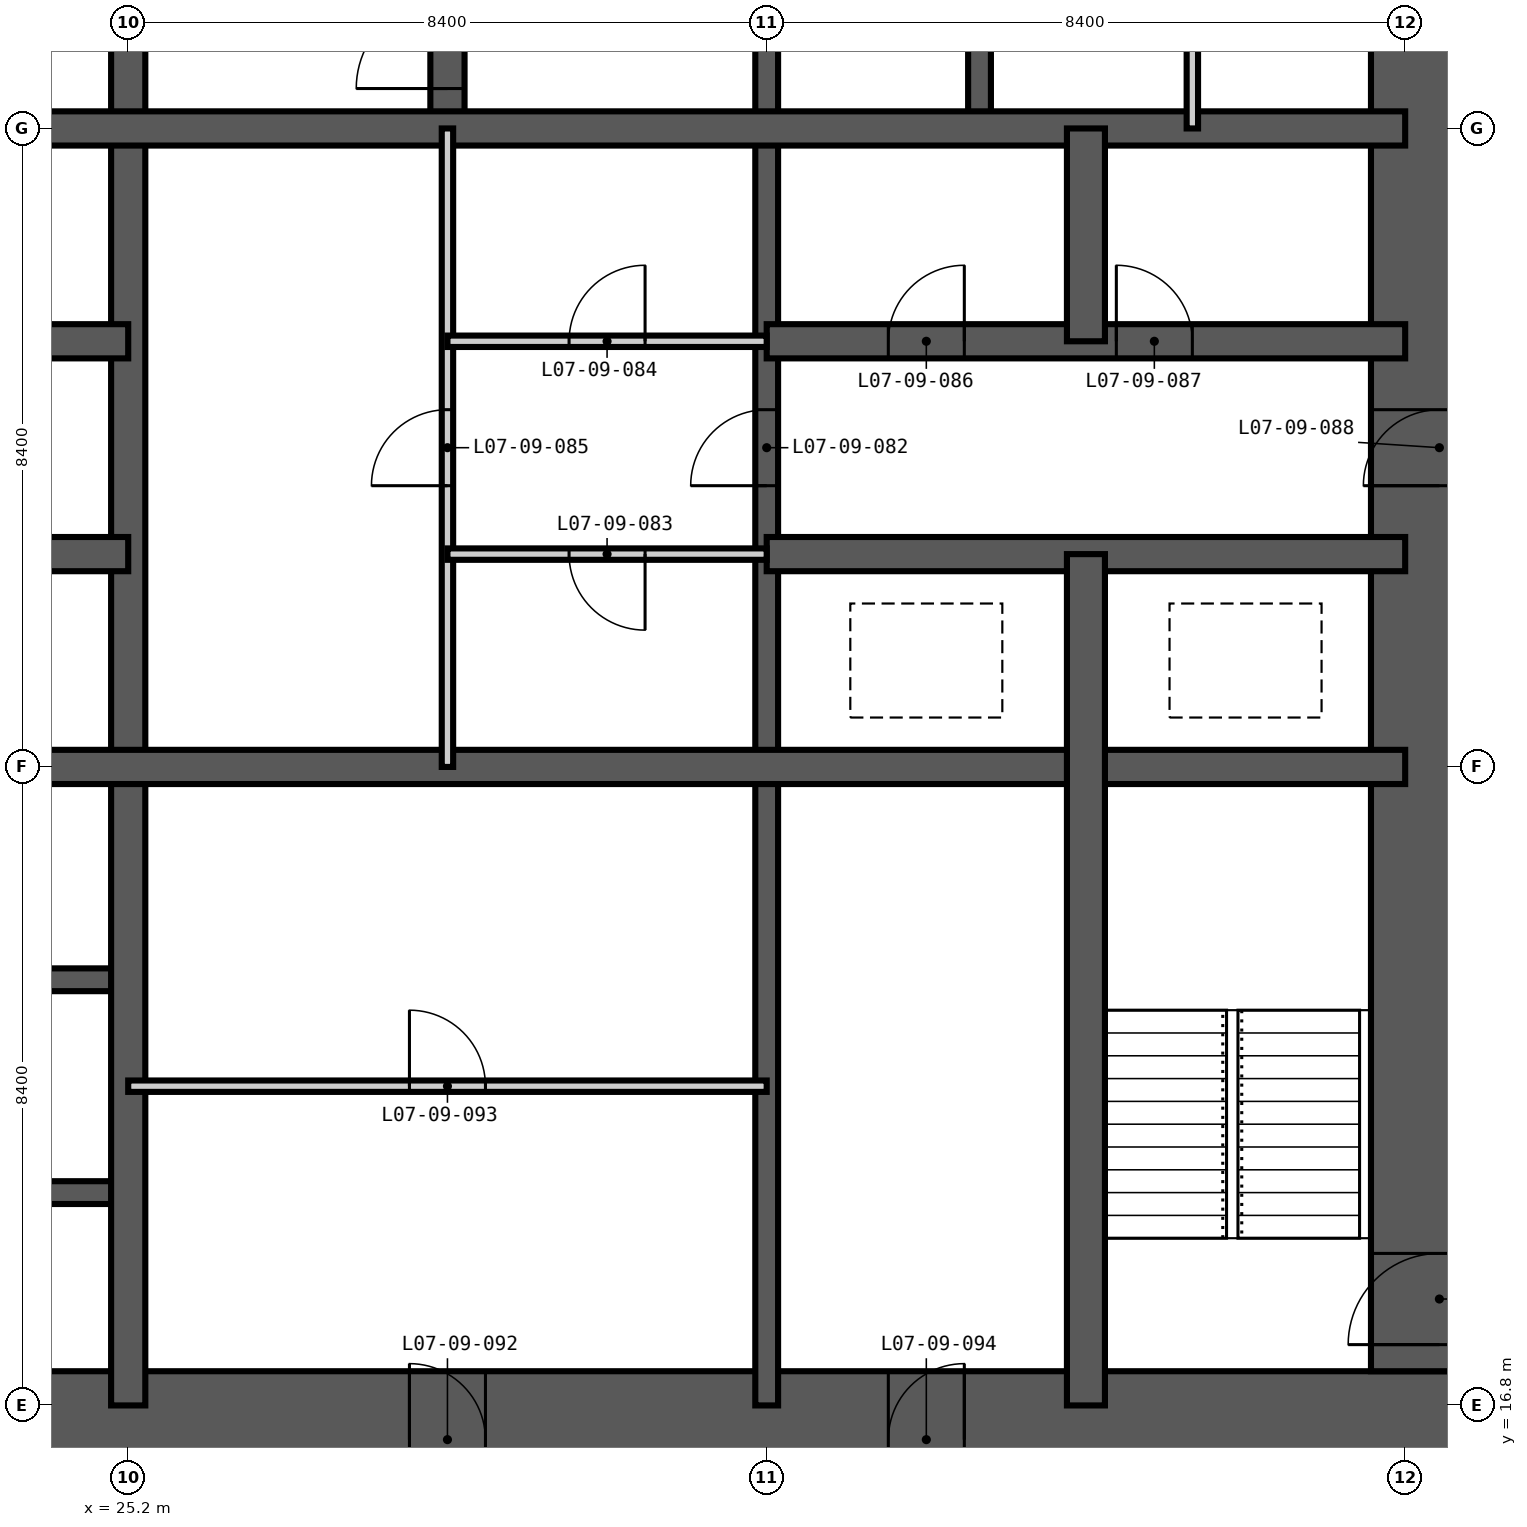
"""IFC4 building model, lengths in metres.
Left out: names, types, materials, properties, quantities, classifications, styles, units other than length and angle.
Written with IfcOpenShell. Run it as: python <this file> out.ifc"""

import sys

from ifc_helpers import new_model, si_unit, direction, frame, frame_2d, origin, place, context, subcontext, project, spatial, rectangle, extrude, element, fill, save


model = new_model("IFC4")
c1 = context("Model", 3, precision=1e-05, world=origin(), true_north=direction((0.0, 1.0)))
c2 = subcontext(c1, "Body", "Model", "MODEL_VIEW")
j1 = project(units=[si_unit("LENGTHUNIT", "METRE"), si_unit("PLANEANGLEUNIT", "RADIAN")], contexts=[c1])
p1 = place(None, origin())
s1 = spatial("IfcSite", under=j1, at=p1, CompositionType="ELEMENT")
p2 = place(p1, origin())
s2 = spatial("IfcBuilding", under=s1, at=p2, CompositionType="ELEMENT")
p3 = place(p2, frame((0.0, 0.0, 34.2)))
s3 = spatial("IfcBuildingStorey", under=s2, at=p3, CompositionType="ELEMENT", Elevation=34.2)
p4 = place(p3, frame((15.45, 16.35, -0.35), z_axis=(0.0, 0.0, 1.0), x_axis=(1.0, 0.0, 0.0)))
e1 = element("IfcWall", 1, at=p4, inside=s3, PredefinedType="SHEAR", context=c2, shape_type="SweptSolid", body=[
    extrude(rectangle(XDim=27.9, YDim=1.8, at=frame_2d((13.95, 0.0))), origin(), (0.0, 0.0, 1.0), 3.6),
])
p5 = place(p4, frame((13.45, 0.0, 0.35)))
e2 = element("IfcOpeningElement", 2, at=p5, cuts=e1, PredefinedType="OPENING", context=c2, shape_type="SweptSolid", body=[
    extrude(rectangle(XDim=1.0, YDim=2.1, at=frame_2d((0.5, 1.05))), frame((0.0, 0.91, 0.0), z_axis=(0.0, -1.0, 0.0), x_axis=(1.0, 0.0, 0.0)), (0.0, 0.0, 1.0), 1.82),
])
p6 = place(p4, frame((19.75, 0.0, 0.35)))
e3 = element("IfcOpeningElement", 3, at=p6, cuts=e1, PredefinedType="OPENING", context=c2, shape_type="SweptSolid", body=[
    extrude(rectangle(XDim=1.0, YDim=2.1, at=frame_2d((0.5, 1.05))), frame((0.0, 0.91, 0.0), z_axis=(0.0, -1.0, 0.0), x_axis=(1.0, 0.0, 0.0)), (0.0, 0.0, 1.0), 1.82),
])
p7 = place(p3, frame((42.45, 17.25, -0.35), z_axis=(0.0, 0.0, 1.0), x_axis=(0.0, 1.0, 0.0)))
e4 = element("IfcWall", 4, at=p7, inside=s3, PredefinedType="SHEAR", context=c2, shape_type="SweptSolid", body=[
    extrude(rectangle(XDim=24.3, YDim=1.8, at=frame_2d((12.15, 0.0))), origin(), (0.0, 0.0, 1.0), 3.6),
])
p8 = place(p7, frame((0.35, 0.0, 0.35)))
e5 = element("IfcOpeningElement", 5, at=p8, cuts=e4, PredefinedType="OPENING", context=c2, shape_type="SweptSolid", body=[
    extrude(rectangle(XDim=1.2, YDim=2.2, at=frame_2d((0.6, 1.1))), frame((0.0, 0.91, 0.0), z_axis=(0.0, -1.0, 0.0), x_axis=(1.0, 0.0, 0.0)), (0.0, 0.0, 1.0), 1.82),
])
p9 = place(p7, frame((11.65, 0.0, 0.35)))
e6 = element("IfcOpeningElement", 6, at=p9, cuts=e4, PredefinedType="OPENING", context=c2, shape_type="SweptSolid", body=[
    extrude(rectangle(XDim=1.0, YDim=2.1, at=frame_2d((0.5, 1.05))), frame((0.0, 0.91, 0.0), z_axis=(0.0, -1.0, 0.0), x_axis=(1.0, 0.0, 0.0)), (0.0, 0.0, 1.0), 1.82),
])
p10 = place(p7, frame((20.05, 0.0, 0.35)))
e7 = element("IfcOpeningElement", 7, at=p10, cuts=e4, PredefinedType="OPENING", context=c2, shape_type="SweptSolid", body=[
    extrude(rectangle(XDim=1.0, YDim=2.1, at=frame_2d((0.5, 1.05))), frame((0.0, 0.91, 0.0), z_axis=(0.0, -1.0, 0.0), x_axis=(1.0, 0.0, 0.0)), (0.0, 0.0, 1.0), 1.82),
])
p11 = place(p3, frame((33.6, 16.8, -0.35), z_axis=(0.0, 0.0, 1.0), x_axis=(0.0, 1.0, 0.0)))
e8 = element("IfcWall", 8, at=p11, inside=s3, PredefinedType="SHEAR", context=c2, shape_type="SweptSolid", body=[
    extrude(rectangle(XDim=25.2, YDim=0.3, at=frame_2d((12.6, 0.0))), origin(), (0.0, 0.0, 1.0), 3.6),
])
p12 = place(p11, frame((22.5, 0.0, 0.35)))
e9 = element("IfcOpeningElement", 9, at=p12, cuts=e8, PredefinedType="OPENING", context=c2, shape_type="SweptSolid", body=[
    extrude(rectangle(XDim=1.2, YDim=2.2, at=frame_2d((0.6, 1.1))), frame((0.0, 0.16, 0.0), z_axis=(0.0, -1.0, 0.0), x_axis=(1.0, 0.0, 0.0)), (0.0, 0.0, 1.0), 0.32),
])
p13 = place(p11, frame((18.3, 0.0, 0.35)))
e10 = element("IfcOpeningElement", 10, at=p13, cuts=e8, PredefinedType="OPENING", context=c2, shape_type="SweptSolid", body=[
    extrude(rectangle(XDim=1.2, YDim=2.2, at=frame_2d((0.6, 1.1))), frame((0.0, 0.16, 0.0), z_axis=(0.0, -1.0, 0.0), x_axis=(1.0, 0.0, 0.0)), (0.0, 0.0, 1.0), 0.32),
])
p14 = place(p11, frame((12.1, 0.0, 0.35)))
e11 = element("IfcOpeningElement", 11, at=p14, cuts=e8, PredefinedType="OPENING", context=c2, shape_type="SweptSolid", body=[
    extrude(rectangle(XDim=1.0, YDim=2.1, at=frame_2d((0.5, 1.05))), frame((0.0, 0.16, 0.0), z_axis=(0.0, -1.0, 0.0), x_axis=(1.0, 0.0, 0.0)), (0.0, 0.0, 1.0), 0.32),
])
for number, where, z_axis, x_axis in (
    (12, (36.4, 33.6, -0.35), (0.0, 0.0, 1.0), (0.0, 1.0, 0.0)),
    (13, (16.8, 19.6, -0.35), (0.0, 0.0, 1.0), (1.0, 0.0, 0.0)),
    (14, (16.8, 22.4, -0.35), (0.0, 0.0, 1.0), (1.0, 0.0, 0.0)),
):
    element("IfcWall", number, at=place(p3, frame(where, z_axis=z_axis, x_axis=x_axis)), inside=s3, PredefinedType="SHEAR", context=c2, shape_type="SweptSolid", body=[
        extrude(rectangle(XDim=8.4, YDim=0.3, at=frame_2d((4.2, 0.0))), origin(), (0.0, 0.0, 1.0), 3.6),
    ])
p15 = place(p3, frame((25.2, 16.8, -0.35), z_axis=(0.0, 0.0, 1.0), x_axis=(0.0, 1.0, 0.0)))
e15 = element("IfcWall", 15, at=p15, inside=s3, PredefinedType="SHEAR", context=c2, shape_type="SweptSolid", body=[
    extrude(rectangle(XDim=25.2, YDim=0.45, at=frame_2d((12.6, 0.0))), origin(), (0.0, 0.0, 1.0), 3.6),
])
p16 = place(p3, frame((29.4, 33.6, -0.35), z_axis=(0.0, 0.0, 1.0), x_axis=(0.0, 1.0, 0.0)))
e16 = element("IfcWall", 16, at=p16, inside=s3, PredefinedType="SHEAR", context=c2, shape_type="SweptSolid", body=[
    extrude(rectangle(XDim=8.4, YDim=0.45, at=frame_2d((4.2, 0.0))), origin(), (0.0, 0.0, 1.0), 3.6),
])
p17 = place(p16, frame((0.525, 0.0, 0.35)))
e17 = element("IfcOpeningElement", 17, at=p17, cuts=e16, PredefinedType="OPENING", context=c2, shape_type="SweptSolid", body=[
    extrude(rectangle(XDim=1.2, YDim=2.2, at=frame_2d((0.6, 1.1))), frame((0.0, 0.235, 0.0), z_axis=(0.0, -1.0, 0.0), x_axis=(1.0, 0.0, 0.0)), (0.0, 0.0, 1.0), 0.47),
])
p18 = place(p3, frame((16.8, 25.2, -0.35), z_axis=(0.0, 0.0, 1.0), x_axis=(1.0, 0.0, 0.0)))
e18 = element("IfcWall", 18, at=p18, inside=s3, PredefinedType="SHEAR", context=c2, shape_type="SweptSolid", body=[
    extrude(rectangle(XDim=25.2, YDim=0.45, at=frame_2d((12.6, 0.0))), origin(), (0.0, 0.0, 1.0), 3.6),
])
p19 = place(p3, frame((16.8, 28.0, -0.35), z_axis=(0.0, 0.0, 1.0), x_axis=(1.0, 0.0, 0.0)))
e19 = element("IfcWall", 19, at=p19, inside=s3, PredefinedType="SHEAR", context=c2, shape_type="SweptSolid", body=[
    extrude(rectangle(XDim=8.4, YDim=0.45, at=frame_2d((4.2, 0.0))), origin(), (0.0, 0.0, 1.0), 3.6),
])
p20 = place(p19, frame((1.55, 0.0, 0.35)))
e20 = element("IfcOpeningElement", 20, at=p20, cuts=e19, PredefinedType="OPENING", context=c2, shape_type="SweptSolid", body=[
    extrude(rectangle(XDim=1.1, YDim=2.2, at=frame_2d((0.55, 1.1))), frame((0.0, 0.235, 0.0), z_axis=(0.0, -1.0, 0.0), x_axis=(1.0, 0.0, 0.0)), (0.0, 0.0, 1.0), 0.47),
])
p21 = place(p19, frame((5.75, 0.0, 0.35)))
e21 = element("IfcOpeningElement", 21, at=p21, cuts=e19, PredefinedType="OPENING", context=c2, shape_type="SweptSolid", body=[
    extrude(rectangle(XDim=1.1, YDim=2.2, at=frame_2d((0.55, 1.1))), frame((0.0, 0.235, 0.0), z_axis=(0.0, -1.0, 0.0), x_axis=(1.0, 0.0, 0.0)), (0.0, 0.0, 1.0), 0.47),
])
p22 = place(p3, frame((33.6, 28.0, -0.35), z_axis=(0.0, 0.0, 1.0), x_axis=(1.0, 0.0, 0.0)))
e22 = element("IfcWall", 22, at=p22, inside=s3, PredefinedType="SHEAR", context=c2, shape_type="SweptSolid", body=[
    extrude(rectangle(XDim=8.4, YDim=0.45, at=frame_2d((4.2, 0.0))), origin(), (0.0, 0.0, 1.0), 3.6),
])
p23 = place(p3, frame((16.8, 30.8, -0.35), z_axis=(0.0, 0.0, 1.0), x_axis=(1.0, 0.0, 0.0)))
e23 = element("IfcWall", 23, at=p23, inside=s3, PredefinedType="SHEAR", context=c2, shape_type="SweptSolid", body=[
    extrude(rectangle(XDim=8.4, YDim=0.45, at=frame_2d((4.2, 0.0))), origin(), (0.0, 0.0, 1.0), 3.6),
])
p24 = place(p23, frame((1.55, 0.0, 0.35)))
e24 = element("IfcOpeningElement", 24, at=p24, cuts=e23, PredefinedType="OPENING", context=c2, shape_type="SweptSolid", body=[
    extrude(rectangle(XDim=1.1, YDim=2.2, at=frame_2d((0.55, 1.1))), frame((0.0, 0.235, 0.0), z_axis=(0.0, -1.0, 0.0), x_axis=(1.0, 0.0, 0.0)), (0.0, 0.0, 1.0), 0.47),
])
p25 = place(p23, frame((5.75, 0.0, 0.35)))
e25 = element("IfcOpeningElement", 25, at=p25, cuts=e23, PredefinedType="OPENING", context=c2, shape_type="SweptSolid", body=[
    extrude(rectangle(XDim=1.1, YDim=2.2, at=frame_2d((0.55, 1.1))), frame((0.0, 0.235, 0.0), z_axis=(0.0, -1.0, 0.0), x_axis=(1.0, 0.0, 0.0)), (0.0, 0.0, 1.0), 0.47),
])
p26 = place(p3, frame((33.6, 30.8, -0.35), z_axis=(0.0, 0.0, 1.0), x_axis=(1.0, 0.0, 0.0)))
e26 = element("IfcWall", 26, at=p26, inside=s3, PredefinedType="SHEAR", context=c2, shape_type="SweptSolid", body=[
    extrude(rectangle(XDim=8.4, YDim=0.45, at=frame_2d((4.2, 0.0))), origin(), (0.0, 0.0, 1.0), 3.6),
])
p27 = place(p26, frame((1.6, 0.0, 0.35)))
e27 = element("IfcOpeningElement", 27, at=p27, cuts=e26, PredefinedType="OPENING", context=c2, shape_type="SweptSolid", body=[
    extrude(rectangle(XDim=1.0, YDim=2.1, at=frame_2d((0.5, 1.05))), frame((0.0, 0.235, 0.0), z_axis=(0.0, -1.0, 0.0), x_axis=(1.0, 0.0, 0.0)), (0.0, 0.0, 1.0), 0.47),
])
p28 = place(p26, frame((4.6, 0.0, 0.35)))
e28 = element("IfcOpeningElement", 28, at=p28, cuts=e26, PredefinedType="OPENING", context=c2, shape_type="SweptSolid", body=[
    extrude(rectangle(XDim=1.0, YDim=2.1, at=frame_2d((0.5, 1.05))), frame((0.0, 0.235, 0.0), z_axis=(0.0, -1.0, 0.0), x_axis=(1.0, 0.0, 0.0)), (0.0, 0.0, 1.0), 0.47),
])
p29 = place(p3, frame((16.8, 33.6, -0.35), z_axis=(0.0, 0.0, 1.0), x_axis=(1.0, 0.0, 0.0)))
e29 = element("IfcWall", 29, at=p29, inside=s3, PredefinedType="SHEAR", context=c2, shape_type="SweptSolid", body=[
    extrude(rectangle(XDim=25.2, YDim=0.45, at=frame_2d((12.6, 0.0))), origin(), (0.0, 0.0, 1.0), 3.6),
])
p30 = place(p3, frame((37.8, 16.8, -0.35), z_axis=(0.0, 0.0, 1.0), x_axis=(0.0, 1.0, 0.0)))
e30 = element("IfcWall", 30, at=p30, inside=s3, PredefinedType="SHEAR", context=c2, shape_type="SweptSolid", body=[
    extrude(rectangle(XDim=11.2, YDim=0.5, at=frame_2d((5.6, 0.0))), origin(), (0.0, 0.0, 1.0), 3.6),
])
p31 = place(p3, frame((37.8, 30.8, -0.35), z_axis=(0.0, 0.0, 1.0), x_axis=(0.0, 1.0, 0.0)))
e31 = element("IfcWall", 31, at=p31, inside=s3, PredefinedType="SHEAR", context=c2, shape_type="SweptSolid", body=[
    extrude(rectangle(XDim=2.8, YDim=0.5, at=frame_2d((1.4, 0.0))), origin(), (0.0, 0.0, 1.0), 3.6),
])
p32 = place(p3, frame((29.4, 25.2, 0.0), z_axis=(0.0, 0.0, 1.0), x_axis=(0.0, 1.0, 0.0)))
e32 = element("IfcWall", 32, at=p32, inside=s3, PredefinedType="PARTITIONING", context=c2, shape_type="SweptSolid", body=[
    extrude(rectangle(XDim=8.4, YDim=0.15, at=frame_2d((4.2, 0.0))), origin(), (0.0, 0.0, 1.0), 3.25),
])
p33 = place(p32, frame((3.7, 0.0, 0.0)))
e33 = element("IfcOpeningElement", 33, at=p33, cuts=e32, PredefinedType="OPENING", context=c2, shape_type="SweptSolid", body=[
    extrude(rectangle(XDim=1.0, YDim=2.1, at=frame_2d((0.5, 1.05))), frame((0.0, 0.085, 0.0), z_axis=(0.0, -1.0, 0.0), x_axis=(1.0, 0.0, 0.0)), (0.0, 0.0, 1.0), 0.17),
])
p34 = place(p3, frame((39.2, 33.6, 0.0), z_axis=(0.0, 0.0, 1.0), x_axis=(0.0, 1.0, 0.0)))
e34 = element("IfcWall", 34, at=p34, inside=s3, PredefinedType="PARTITIONING", context=c2, shape_type="SweptSolid", body=[
    extrude(rectangle(XDim=8.4, YDim=0.15, at=frame_2d((4.2, 0.0))), origin(), (0.0, 0.0, 1.0), 3.25),
])
p35 = place(p34, frame((3.7, 0.0, 0.0)))
e35 = element("IfcOpeningElement", 35, at=p35, cuts=e34, PredefinedType="OPENING", context=c2, shape_type="SweptSolid", body=[
    extrude(rectangle(XDim=1.0, YDim=2.1, at=frame_2d((0.5, 1.05))), frame((0.0, 0.085, 0.0), z_axis=(0.0, -1.0, 0.0), x_axis=(1.0, 0.0, 0.0)), (0.0, 0.0, 1.0), 0.17),
])
p36 = place(p3, frame((25.2, 21.0, 0.0), z_axis=(0.0, 0.0, 1.0), x_axis=(1.0, 0.0, 0.0)))
e36 = element("IfcWall", 36, at=p36, inside=s3, PredefinedType="PARTITIONING", context=c2, shape_type="SweptSolid", body=[
    extrude(rectangle(XDim=8.4, YDim=0.15, at=frame_2d((4.2, 0.0))), origin(), (0.0, 0.0, 1.0), 3.25),
])
p37 = place(p36, frame((3.7, 0.0, 0.0)))
e37 = element("IfcOpeningElement", 37, at=p37, cuts=e36, PredefinedType="OPENING", context=c2, shape_type="SweptSolid", body=[
    extrude(rectangle(XDim=1.0, YDim=2.1, at=frame_2d((0.5, 1.05))), frame((0.0, 0.085, 0.0), z_axis=(0.0, -1.0, 0.0), x_axis=(1.0, 0.0, 0.0)), (0.0, 0.0, 1.0), 0.17),
])
p38 = place(p3, frame((29.4, 28.0, 0.0), z_axis=(0.0, 0.0, 1.0), x_axis=(1.0, 0.0, 0.0)))
e38 = element("IfcWall", 38, at=p38, inside=s3, PredefinedType="PARTITIONING", context=c2, shape_type="SweptSolid", body=[
    extrude(rectangle(XDim=4.2, YDim=0.15, at=frame_2d((2.1, 0.0))), origin(), (0.0, 0.0, 1.0), 3.25),
])
p39 = place(p38, frame((1.6, 0.0, 0.0)))
e39 = element("IfcOpeningElement", 39, at=p39, cuts=e38, PredefinedType="OPENING", context=c2, shape_type="SweptSolid", body=[
    extrude(rectangle(XDim=1.0, YDim=2.1, at=frame_2d((0.5, 1.05))), frame((0.0, 0.085, 0.0), z_axis=(0.0, -1.0, 0.0), x_axis=(1.0, 0.0, 0.0)), (0.0, 0.0, 1.0), 0.17),
])
p40 = place(p3, frame((29.4, 30.8, 0.0), z_axis=(0.0, 0.0, 1.0), x_axis=(1.0, 0.0, 0.0)))
e40 = element("IfcWall", 40, at=p40, inside=s3, PredefinedType="PARTITIONING", context=c2, shape_type="SweptSolid", body=[
    extrude(rectangle(XDim=4.2, YDim=0.15, at=frame_2d((2.1, 0.0))), origin(), (0.0, 0.0, 1.0), 3.25),
])
p41 = place(p40, frame((1.6, 0.0, 0.0)))
e41 = element("IfcOpeningElement", 41, at=p41, cuts=e40, PredefinedType="OPENING", context=c2, shape_type="SweptSolid", body=[
    extrude(rectangle(XDim=1.0, YDim=2.1, at=frame_2d((0.5, 1.05))), frame((0.0, 0.085, 0.0), z_axis=(0.0, -1.0, 0.0), x_axis=(1.0, 0.0, 0.0)), (0.0, 0.0, 1.0), 0.17),
])
p42 = place(p17, origin())
e42 = element("IfcDoor", 42, at=p42, inside=s3, OperationType="SINGLE_SWING_LEFT", PredefinedType="DOOR", context=c2, shape_type="SweptSolid", body=[
    extrude(rectangle(XDim=1.2, YDim=2.2, at=frame_2d((0.6, 1.1))), frame((0.0, 0.025, 0.0), z_axis=(0.0, -1.0, 0.0), x_axis=(1.0, 0.0, 0.0)), (0.0, 0.0, 1.0), 0.05),
])
fill(e17, e42)
p43 = place(p8, origin())
e43 = element("IfcDoor", 43, at=p43, inside=s3, OperationType="SINGLE_SWING_LEFT", PredefinedType="DOOR", context=c2, shape_type="SweptSolid", body=[
    extrude(rectangle(XDim=1.2, YDim=2.2, at=frame_2d((0.6, 1.1))), frame((0.0, 0.025, 0.0), z_axis=(0.0, -1.0, 0.0), x_axis=(1.0, 0.0, 0.0)), (0.0, 0.0, 1.0), 0.05),
])
fill(e5, e43)
p44 = place(p14, origin())
e44 = element("IfcDoor", 44, at=p44, inside=s3, OperationType="SINGLE_SWING_LEFT", PredefinedType="DOOR", context=c2, shape_type="SweptSolid", body=[
    extrude(rectangle(XDim=1.0, YDim=2.1, at=frame_2d((0.5, 1.05))), frame((0.0, 0.025, 0.0), z_axis=(0.0, -1.0, 0.0), x_axis=(1.0, 0.0, 0.0)), (0.0, 0.0, 1.0), 0.05),
])
fill(e11, e44)
p45 = place(p39, frame((1.0, 0.0, 0.0), z_axis=(0.0, 0.0, 1.0), x_axis=(-1.0, 0.0, 0.0)))
e45 = element("IfcDoor", 45, at=p45, inside=s3, OperationType="SINGLE_SWING_LEFT", PredefinedType="DOOR", context=c2, shape_type="SweptSolid", body=[
    extrude(rectangle(XDim=1.0, YDim=2.1, at=frame_2d((0.5, 1.05))), frame((0.0, 0.025, 0.0), z_axis=(0.0, -1.0, 0.0), x_axis=(1.0, 0.0, 0.0)), (0.0, 0.0, 1.0), 0.05),
])
fill(e39, e45)
p46 = place(p41, origin())
e46 = element("IfcDoor", 46, at=p46, inside=s3, OperationType="SINGLE_SWING_RIGHT", PredefinedType="DOOR", context=c2, shape_type="SweptSolid", body=[
    extrude(rectangle(XDim=1.0, YDim=2.1, at=frame_2d((0.5, 1.05))), frame((0.0, 0.025, 0.0), z_axis=(0.0, -1.0, 0.0), x_axis=(1.0, 0.0, 0.0)), (0.0, 0.0, 1.0), 0.05),
])
fill(e41, e46)
p47 = place(p33, origin())
e47 = element("IfcDoor", 47, at=p47, inside=s3, OperationType="SINGLE_SWING_LEFT", PredefinedType="DOOR", context=c2, shape_type="SweptSolid", body=[
    extrude(rectangle(XDim=1.0, YDim=2.1, at=frame_2d((0.5, 1.05))), frame((0.0, 0.025, 0.0), z_axis=(0.0, -1.0, 0.0), x_axis=(1.0, 0.0, 0.0)), (0.0, 0.0, 1.0), 0.05),
])
fill(e33, e47)
p48 = place(p27, origin())
e48 = element("IfcDoor", 48, at=p48, inside=s3, OperationType="SINGLE_SWING_RIGHT", PredefinedType="DOOR", context=c2, shape_type="SweptSolid", body=[
    extrude(rectangle(XDim=1.0, YDim=2.1, at=frame_2d((0.5, 1.05))), frame((0.0, 0.025, 0.0), z_axis=(0.0, -1.0, 0.0), x_axis=(1.0, 0.0, 0.0)), (0.0, 0.0, 1.0), 0.05),
])
fill(e27, e48)
p49 = place(p28, origin())
e49 = element("IfcDoor", 49, at=p49, inside=s3, OperationType="SINGLE_SWING_LEFT", PredefinedType="DOOR", context=c2, shape_type="SweptSolid", body=[
    extrude(rectangle(XDim=1.0, YDim=2.1, at=frame_2d((0.5, 1.05))), frame((0.0, 0.025, 0.0), z_axis=(0.0, -1.0, 0.0), x_axis=(1.0, 0.0, 0.0)), (0.0, 0.0, 1.0), 0.05),
])
fill(e28, e49)
p50 = place(p9, origin())
e50 = element("IfcDoor", 50, at=p50, inside=s3, OperationType="SINGLE_SWING_LEFT", PredefinedType="DOOR", context=c2, shape_type="SweptSolid", body=[
    extrude(rectangle(XDim=1.0, YDim=2.1, at=frame_2d((0.5, 1.05))), frame((0.0, 0.025, 0.0), z_axis=(0.0, -1.0, 0.0), x_axis=(1.0, 0.0, 0.0)), (0.0, 0.0, 1.0), 0.05),
])
fill(e6, e50)
p51 = place(p5, origin())
e51 = element("IfcDoor", 51, at=p51, inside=s3, OperationType="SINGLE_SWING_LEFT", PredefinedType="DOOR", context=c2, shape_type="SweptSolid", body=[
    extrude(rectangle(XDim=1.0, YDim=2.1, at=frame_2d((0.5, 1.05))), frame((0.0, 0.025, 0.0), z_axis=(0.0, -1.0, 0.0), x_axis=(1.0, 0.0, 0.0)), (0.0, 0.0, 1.0), 0.05),
])
fill(e2, e51)
p52 = place(p37, origin())
e52 = element("IfcDoor", 52, at=p52, inside=s3, OperationType="SINGLE_SWING_LEFT", PredefinedType="DOOR", context=c2, shape_type="SweptSolid", body=[
    extrude(rectangle(XDim=1.0, YDim=2.1, at=frame_2d((0.5, 1.05))), frame((0.0, 0.025, 0.0), z_axis=(0.0, -1.0, 0.0), x_axis=(1.0, 0.0, 0.0)), (0.0, 0.0, 1.0), 0.05),
])
fill(e37, e52)
p53 = place(p6, origin())
e53 = element("IfcDoor", 53, at=p53, inside=s3, OperationType="SINGLE_SWING_RIGHT", PredefinedType="DOOR", context=c2, shape_type="SweptSolid", body=[
    extrude(rectangle(XDim=1.0, YDim=2.1, at=frame_2d((0.5, 1.05))), frame((0.0, 0.025, 0.0), z_axis=(0.0, -1.0, 0.0), x_axis=(1.0, 0.0, 0.0)), (0.0, 0.0, 1.0), 0.05),
])
fill(e3, e53)
save(model, sys.argv[1])
